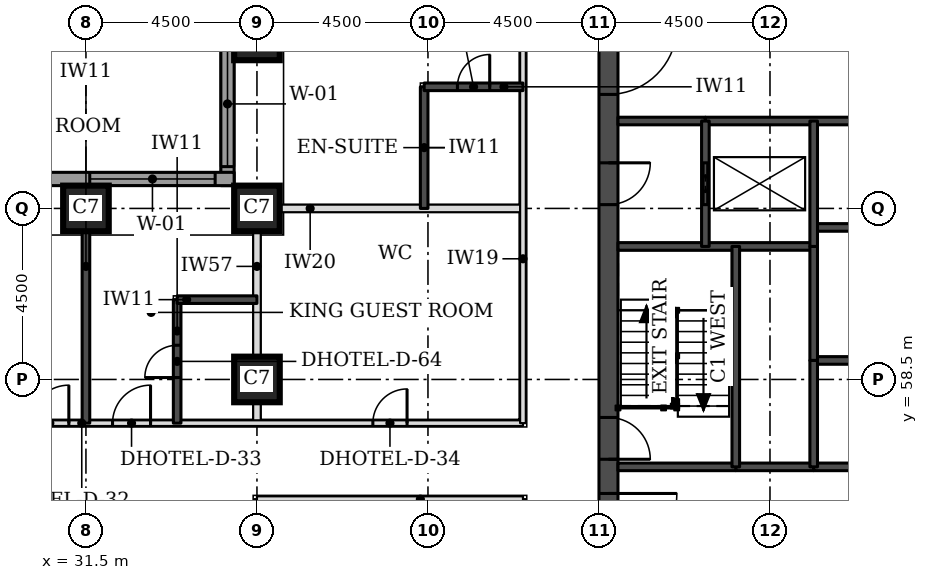
"""IFC4 building model, lengths in metres.
Left out: names, types, materials, properties, quantities, classifications, styles, units other than length and angle.
Written with IfcOpenShell. Run it as: python <this file> out.ifc"""

import sys

from ifc_helpers import new_model, si_unit, direction, frame, frame_2d, origin, origin_2d, place, context, subcontext, project, spatial, rectangle, extrude, element, fill, save


model = new_model("IFC4")
c1 = context("Model", 3, precision=1e-05, world=origin(), true_north=direction((0.0, 1.0)))
c2 = subcontext(c1, "Body", "Model", "MODEL_VIEW")
j1 = project(units=[si_unit("LENGTHUNIT", "METRE"), si_unit("PLANEANGLEUNIT", "RADIAN")], contexts=[c1])
p1 = place(None, origin())
s1 = spatial("IfcSite", under=j1, at=p1, CompositionType="ELEMENT")
p2 = place(p1, origin())
s2 = spatial("IfcBuilding", under=s1, at=p2, CompositionType="ELEMENT")
p3 = place(p2, frame((0.0, 0.0, 36.3)))
s3 = spatial("IfcBuildingStorey", under=s2, at=p3, CompositionType="ELEMENT", Elevation=36.3)
for number, where, z_axis, x_axis in (
    (1, (36.0, 58.5, 0.0), (0.0, 0.0, 1.0), (1.0, 0.0, 0.0)),
    (2, (31.5, 63.0, 0.0), (0.0, 0.0, 1.0), (1.0, 0.0, 0.0)),
    (3, (36.0, 63.0, 0.0), (0.0, 0.0, 1.0), (1.0, 0.0, 0.0)),
    (4, (36.0, 67.5, 0.0), (0.0, 0.0, 1.0), (1.0, 0.0, 0.0)),
):
    element("IfcColumn", number, at=place(p3, frame(where, z_axis=z_axis, x_axis=x_axis)), inside=s3, PredefinedType="COLUMN", context=c2, shape_type="SweptSolid", body=[
        extrude(rectangle(XDim=1.2, YDim=1.2, at=origin_2d()), origin(), (0.0, 0.0, 1.0), 3.3),
    ])
p4 = place(p3, frame((45.25, 49.5, 0.0), z_axis=(0.0, 0.0, 1.0), x_axis=(0.0, 1.0, 0.0)))
e5 = element("IfcWall", 5, at=p4, inside=s3, PredefinedType="SHEAR", context=c2, shape_type="SweptSolid", body=[
    extrude(rectangle(XDim=22.5, YDim=0.5, at=frame_2d((11.25, 0.0))), origin(), (0.0, 0.0, 1.0), 3.3),
])
p5 = place(p4, frame((4.2, 0.0, 0.0)))
e6 = element("IfcOpeningElement", 6, at=p5, cuts=e5, PredefinedType="OPENING", context=c2, shape_type="SweptSolid", body=[
    extrude(rectangle(XDim=1.8, YDim=2.1, at=frame_2d((0.9, 1.05))), frame((0.0, 0.26, 0.0), z_axis=(0.0, -1.0, 0.0), x_axis=(1.0, 0.0, 0.0)), (0.0, 0.0, 1.0), 0.52),
])
p6 = place(p4, frame((6.9, 0.0, 0.0)))
e7 = element("IfcOpeningElement", 7, at=p6, cuts=e5, PredefinedType="OPENING", context=c2, shape_type="SweptSolid", body=[
    extrude(rectangle(XDim=1.1, YDim=2.1, at=frame_2d((0.55, 1.05))), frame((0.0, 0.26, 0.0), z_axis=(0.0, -1.0, 0.0), x_axis=(1.0, 0.0, 0.0)), (0.0, 0.0, 1.0), 0.52),
])
p7 = place(p4, frame((13.6, 0.0, 0.0)))
e8 = element("IfcOpeningElement", 8, at=p7, cuts=e5, PredefinedType="OPENING", context=c2, shape_type="SweptSolid", body=[
    extrude(rectangle(XDim=1.1, YDim=2.1, at=frame_2d((0.55, 1.05))), frame((0.0, 0.26, 0.0), z_axis=(0.0, -1.0, 0.0), x_axis=(1.0, 0.0, 0.0)), (0.0, 0.0, 1.0), 0.52),
])
p8 = place(p4, frame((16.5, 0.0, 0.0)))
e9 = element("IfcOpeningElement", 9, at=p8, cuts=e5, PredefinedType="OPENING", context=c2, shape_type="SweptSolid", body=[
    extrude(rectangle(XDim=1.8, YDim=2.1, at=frame_2d((0.9, 1.05))), frame((0.0, 0.26, 0.0), z_axis=(0.0, -1.0, 0.0), x_axis=(1.0, 0.0, 0.0)), (0.0, 0.0, 1.0), 0.52),
])
p9 = place(p3, frame((35.225, 76.894, 0.0), z_axis=(0.0, 0.0, 1.0), x_axis=(0.0, -1.0, 0.0)))
e10 = element("IfcWall", 10, at=p9, inside=s3, PredefinedType="STANDARD", context=c2, shape_type="SweptSolid", body=[
    extrude(rectangle(XDim=13.293, YDim=0.35, at=frame_2d((6.647, 0.0))), origin(), (0.0, 0.0, 1.0), 3.055),
])
p10 = place(p9, frame((9.493, 0.0, 0.8)))
e11 = element("IfcOpeningElement", 11, at=p10, cuts=e10, PredefinedType="OPENING", context=c2, shape_type="SweptSolid", body=[
    extrude(rectangle(XDim=3.3, YDim=1.5, at=frame_2d((1.65, 0.75))), frame((0.0, 0.185, 0.0), z_axis=(0.0, -1.0, 0.0), x_axis=(1.0, 0.0, 0.0)), (0.0, 0.0, 1.0), 0.37),
])
p11 = place(p3, frame((35.4, 63.775, 0.0), z_axis=(0.0, 0.0, 1.0), x_axis=(-1.0, 0.0, 0.0)))
e12 = element("IfcWall", 12, at=p11, inside=s3, PredefinedType="STANDARD", context=c2, shape_type="SweptSolid", body=[
    extrude(rectangle(XDim=17.793, YDim=0.35, at=frame_2d((8.897, 0.0))), origin(), (0.0, 0.0, 1.0), 3.055),
])
p12 = place(p11, frame((0.5, 0.0, 0.8)))
e13 = element("IfcOpeningElement", 13, at=p12, cuts=e12, PredefinedType="OPENING", context=c2, shape_type="SweptSolid", body=[
    extrude(rectangle(XDim=3.3, YDim=1.5, at=frame_2d((1.65, 0.75))), frame((0.0, 0.185, 0.0), z_axis=(0.0, -1.0, 0.0), x_axis=(1.0, 0.0, 0.0)), (0.0, 0.0, 1.0), 0.37),
])
p13 = place(p11, frame((9.0, 0.0, 0.8)))
e14 = element("IfcOpeningElement", 14, at=p13, cuts=e12, PredefinedType="OPENING", context=c2, shape_type="SweptSolid", body=[
    extrude(rectangle(XDim=3.3, YDim=1.5, at=frame_2d((1.65, 0.75))), frame((0.0, 0.185, 0.0), z_axis=(0.0, -1.0, 0.0), x_axis=(1.0, 0.0, 0.0)), (0.0, 0.0, 1.0), 0.37),
])
p14 = place(p3, frame((36.0, 57.35, 0.0), z_axis=(0.0, 0.0, 1.0), x_axis=(0.0, 1.0, 0.0)))
e15 = element("IfcWall", 15, at=p14, inside=s3, PredefinedType="PARTITIONING", context=c2, shape_type="SweptSolid", body=[
    extrude(rectangle(XDim=5.05, YDim=0.2, at=frame_2d((2.525, 0.0))), origin(), (0.0, 0.0, 1.0), 2.33),
])
p15 = place(p3, frame((36.6, 63.0, 0.0), z_axis=(0.0, 0.0, 1.0), x_axis=(1.0, 0.0, 0.0)))
e16 = element("IfcWall", 16, at=p15, inside=s3, PredefinedType="PARTITIONING", context=c2, shape_type="SweptSolid", body=[
    extrude(rectangle(XDim=6.4, YDim=0.2, at=frame_2d((3.2, 0.0))), origin(), (0.0, 0.0, 1.0), 3.08),
])
p16 = place(p3, frame((43.0, 47.5, 0.0), z_axis=(0.0, 0.0, 1.0), x_axis=(0.0, 1.0, 0.0)))
e17 = element("IfcWall", 17, at=p16, inside=s3, PredefinedType="PARTITIONING", context=c2, shape_type="SweptSolid", body=[
    extrude(rectangle(XDim=7.85, YDim=0.15, at=frame_2d((3.925, 0.0))), origin(), (0.0, 0.0, 1.0), 3.08),
])
p17 = place(p16, frame((3.475, 0.0, 0.0)))
e18 = element("IfcOpeningElement", 18, at=p17, cuts=e17, PredefinedType="OPENING", context=c2, shape_type="SweptSolid", body=[
    extrude(rectangle(XDim=0.9, YDim=2.1, at=frame_2d((0.45, 1.05))), frame((0.0, 0.085, 0.0), z_axis=(0.0, -1.0, 0.0), x_axis=(1.0, 0.0, 0.0)), (0.0, 0.0, 1.0), 0.17),
])
p18 = place(p3, frame((36.0, 54.05, 0.0), z_axis=(0.0, 0.0, 1.0), x_axis=(0.0, 1.0, 0.0)))
e19 = element("IfcWall", 19, at=p18, inside=s3, PredefinedType="PARTITIONING", context=c2, shape_type="SweptSolid", body=[
    extrude(rectangle(XDim=1.3, YDim=0.15, at=frame_2d((0.65, 0.0))), origin(), (0.0, 0.0, 1.0), 2.33),
])
p19 = place(p3, frame((36.0, 55.35, 0.0), z_axis=(0.0, 0.0, 1.0), x_axis=(1.0, 0.0, 0.0)))
e20 = element("IfcWall", 20, at=p19, inside=s3, PredefinedType="PARTITIONING", context=c2, shape_type="SweptSolid", body=[
    extrude(rectangle(XDim=7.0, YDim=0.15, at=frame_2d((3.5, 0.0))), origin(), (0.0, 0.0, 1.0), 3.08),
])
p20 = place(p3, frame((29.38, 57.35, 0.0), z_axis=(0.0, 0.0, 1.0), x_axis=(1.0, 0.0, 0.0)))
e21 = element("IfcWall", 21, at=p20, inside=s3, PredefinedType="PARTITIONING", context=c2, shape_type="SweptSolid", body=[
    extrude(rectangle(XDim=13.62, YDim=0.15, at=frame_2d((6.81, 0.0))), origin(), (0.0, 0.0, 1.0), 3.08),
])
p21 = place(p20, frame((2.82, 0.0, 0.0)))
e22 = element("IfcOpeningElement", 22, at=p21, cuts=e21, PredefinedType="OPENING", context=c2, shape_type="SweptSolid", body=[
    extrude(rectangle(XDim=1.0, YDim=2.1, at=frame_2d((0.5, 1.05))), frame((0.0, 0.085, 0.0), z_axis=(0.0, -1.0, 0.0), x_axis=(1.0, 0.0, 0.0)), (0.0, 0.0, 1.0), 0.17),
])
p22 = place(p20, frame((0.67, 0.0, 0.0)))
e23 = element("IfcOpeningElement", 23, at=p22, cuts=e21, PredefinedType="OPENING", context=c2, shape_type="SweptSolid", body=[
    extrude(rectangle(XDim=1.0, YDim=2.1, at=frame_2d((0.5, 1.05))), frame((0.0, 0.085, 0.0), z_axis=(0.0, -1.0, 0.0), x_axis=(1.0, 0.0, 0.0)), (0.0, 0.0, 1.0), 0.17),
])
p23 = place(p20, frame((9.67, 0.0, 0.0)))
e24 = element("IfcOpeningElement", 24, at=p23, cuts=e21, PredefinedType="OPENING", context=c2, shape_type="SweptSolid", body=[
    extrude(rectangle(XDim=0.9, YDim=2.1, at=frame_2d((0.45, 1.05))), frame((0.0, 0.085, 0.0), z_axis=(0.0, -1.0, 0.0), x_axis=(1.0, 0.0, 0.0)), (0.0, 0.0, 1.0), 0.17),
])
p24 = place(p3, frame((43.0, 57.35, 0.0), z_axis=(0.0, 0.0, 1.0), x_axis=(0.0, 1.0, 0.0)))
e25 = element("IfcWall", 25, at=p24, inside=s3, PredefinedType="PARTITIONING", context=c2, shape_type="SweptSolid", body=[
    extrude(rectangle(XDim=16.65, YDim=0.15, at=frame_2d((8.325, 0.0))), origin(), (0.0, 0.0, 1.0), 3.08),
])
p25 = place(p24, frame((11.25, 0.0, 0.0)))
e26 = element("IfcOpeningElement", 26, at=p25, cuts=e25, PredefinedType="OPENING", context=c2, shape_type="SweptSolid", body=[
    extrude(rectangle(XDim=1.0, YDim=2.1, at=frame_2d((0.5, 1.05))), frame((0.0, 0.085, 0.0), z_axis=(0.0, -1.0, 0.0), x_axis=(1.0, 0.0, 0.0)), (0.0, 0.0, 1.0), 0.17),
])
p26 = place(p24, frame((15.203, 0.0, 0.0)))
e27 = element("IfcOpeningElement", 27, at=p26, cuts=e25, PredefinedType="OPENING", context=c2, shape_type="SweptSolid", body=[
    extrude(rectangle(XDim=1.0, YDim=2.1, at=frame_2d((0.5, 1.05))), frame((0.0, 0.085, 0.0), z_axis=(0.0, -1.0, 0.0), x_axis=(1.0, 0.0, 0.0)), (0.0, 0.0, 1.0), 0.17),
])
p27 = place(p3, frame((31.5, 57.35, 0.0), z_axis=(0.0, 0.0, 1.0), x_axis=(0.0, 1.0, 0.0)))
e28 = element("IfcWall", 28, at=p27, inside=s3, PredefinedType="SOLIDWALL", context=c2, shape_type="SweptSolid", body=[
    extrude(rectangle(XDim=5.05, YDim=0.2, at=frame_2d((2.525, 0.0))), origin(), (0.0, 0.0, 1.0), 3.08),
])
p28 = place(p3, frame((33.9, 57.35, 0.0), z_axis=(0.0, 0.0, 1.0), x_axis=(0.0, 1.0, 0.0)))
e29 = element("IfcWall", 29, at=p28, inside=s3, PredefinedType="SOLIDWALL", context=c2, shape_type="SweptSolid", body=[
    extrude(rectangle(XDim=3.25, YDim=0.2, at=frame_2d((1.625, 0.0))), origin(), (0.0, 0.0, 1.0), 3.08),
])
p29 = place(p28, frame((1.2, 0.0, 0.0)))
e30 = element("IfcOpeningElement", 30, at=p29, cuts=e29, PredefinedType="OPENING", context=c2, shape_type="SweptSolid", body=[
    extrude(rectangle(XDim=0.85, YDim=2.1, at=frame_2d((0.425, 1.05))), frame((0.0, 0.11, 0.0), z_axis=(0.0, -1.0, 0.0), x_axis=(1.0, 0.0, 0.0)), (0.0, 0.0, 1.0), 0.22),
])
p30 = place(p3, frame((33.9, 60.6, 0.0), z_axis=(0.0, 0.0, 1.0), x_axis=(1.0, 0.0, 0.0)))
e31 = element("IfcWall", 31, at=p30, inside=s3, PredefinedType="SOLIDWALL", context=c2, shape_type="SweptSolid", body=[
    extrude(rectangle(XDim=2.1, YDim=0.2, at=frame_2d((1.05, 0.0))), origin(), (0.0, 0.0, 1.0), 3.08),
])
p31 = place(p3, frame((40.4, 63.0, 0.0), z_axis=(0.0, 0.0, 1.0), x_axis=(0.0, 1.0, 0.0)))
e32 = element("IfcWall", 32, at=p31, inside=s3, PredefinedType="SOLIDWALL", context=c2, shape_type="SweptSolid", body=[
    extrude(rectangle(XDim=3.2, YDim=0.2, at=frame_2d((1.6, 0.0))), origin(), (0.0, 0.0, 1.0), 3.08),
])
p32 = place(p3, frame((40.4, 66.2, 0.0), z_axis=(0.0, 0.0, 1.0), x_axis=(1.0, 0.0, 0.0)))
e33 = element("IfcWall", 33, at=p32, inside=s3, PredefinedType="SOLIDWALL", context=c2, shape_type="SweptSolid", body=[
    extrude(rectangle(XDim=2.6, YDim=0.2, at=frame_2d((1.3, 0.0))), origin(), (0.0, 0.0, 1.0), 3.08),
])
p33 = place(p32, frame((0.875, 0.0, 0.0)))
e34 = element("IfcOpeningElement", 34, at=p33, cuts=e33, PredefinedType="OPENING", context=c2, shape_type="SweptSolid", body=[
    extrude(rectangle(XDim=0.85, YDim=2.1, at=frame_2d((0.425, 1.05))), frame((0.0, 0.11, 0.0), z_axis=(0.0, -1.0, 0.0), x_axis=(1.0, 0.0, 0.0)), (0.0, 0.0, 1.0), 0.22),
])
p34 = place(p3, frame((48.6, 56.2, 0.0), z_axis=(0.0, 0.0, 1.0), x_axis=(1.0, 0.0, 0.0)))
e35 = element("IfcWall", 35, at=p34, inside=s3, PredefinedType="SOLIDWALL", context=c2, shape_type="SweptSolid", body=[
    extrude(rectangle(XDim=2.05, YDim=0.2, at=frame_2d((1.025, 0.0))), origin(), (0.0, 0.0, 1.0), 3.08),
])
p35 = place(p3, frame((45.5, 56.2, 0.0), z_axis=(0.0, 0.0, 1.0), x_axis=(1.0, 0.0, 0.0)))
e36 = element("IfcWall", 36, at=p35, inside=s3, PredefinedType="SOLIDWALL", context=c2, shape_type="SweptSolid", body=[
    extrude(rectangle(XDim=3.1, YDim=0.2, at=frame_2d((1.55, 0.0))), origin(), (0.0, 0.0, 1.0), 3.08),
])
p36 = place(p3, frame((50.65, 56.2, 0.0), z_axis=(0.0, 0.0, 1.0), x_axis=(1.0, 0.0, 0.0)))
e37 = element("IfcWall", 37, at=p36, inside=s3, PredefinedType="SOLIDWALL", context=c2, shape_type="SweptSolid", body=[
    extrude(rectangle(XDim=11.2, YDim=0.2, at=frame_2d((5.6, 0.0))), origin(), (0.0, 0.0, 1.0), 3.08),
])
p37 = place(p3, frame((50.65, 59.0, 0.0), z_axis=(0.0, 0.0, 1.0), x_axis=(1.0, 0.0, 0.0)))
e38 = element("IfcWall", 38, at=p37, inside=s3, PredefinedType="SOLIDWALL", context=c2, shape_type="SweptSolid", body=[
    extrude(rectangle(XDim=11.2, YDim=0.2, at=frame_2d((5.6, 0.0))), origin(), (0.0, 0.0, 1.0), 3.3),
])
p38 = place(p3, frame((45.5, 62.0, 0.0), z_axis=(0.0, 0.0, 1.0), x_axis=(1.0, 0.0, 0.0)))
e39 = element("IfcWall", 39, at=p38, inside=s3, PredefinedType="SOLIDWALL", context=c2, shape_type="SweptSolid", body=[
    extrude(rectangle(XDim=5.15, YDim=0.2, at=frame_2d((2.575, 0.0))), origin(), (0.0, 0.0, 1.0), 3.08),
])
p39 = place(p3, frame((50.65, 62.5, 0.0), z_axis=(0.0, 0.0, 1.0), x_axis=(1.0, 0.0, 0.0)))
e40 = element("IfcWall", 40, at=p39, inside=s3, PredefinedType="SOLIDWALL", context=c2, shape_type="SweptSolid", body=[
    extrude(rectangle(XDim=11.2, YDim=0.2, at=frame_2d((5.6, 0.0))), origin(), (0.0, 0.0, 1.0), 3.3),
])
p40 = place(p3, frame((45.5, 65.3, 0.0), z_axis=(0.0, 0.0, 1.0), x_axis=(1.0, 0.0, 0.0)))
e41 = element("IfcWall", 41, at=p40, inside=s3, PredefinedType="SOLIDWALL", context=c2, shape_type="SweptSolid", body=[
    extrude(rectangle(XDim=2.3, YDim=0.2, at=frame_2d((1.15, 0.0))), origin(), (0.0, 0.0, 1.0), 3.08),
])
p41 = place(p3, frame((47.8, 65.3, 0.0), z_axis=(0.0, 0.0, 1.0), x_axis=(1.0, 0.0, 0.0)))
e42 = element("IfcWall", 42, at=p41, inside=s3, PredefinedType="SOLIDWALL", context=c2, shape_type="SweptSolid", body=[
    extrude(rectangle(XDim=16.9, YDim=0.2, at=frame_2d((8.45, 0.0))), origin(), (0.0, 0.0, 1.0), 3.08),
])
p42 = place(p3, frame((47.8, 62.0, 0.0), z_axis=(0.0, 0.0, 1.0), x_axis=(0.0, 1.0, 0.0)))
e43 = element("IfcWall", 43, at=p42, inside=s3, PredefinedType="SOLIDWALL", context=c2, shape_type="SweptSolid", body=[
    extrude(rectangle(XDim=3.3, YDim=0.2, at=frame_2d((1.65, 0.0))), origin(), (0.0, 0.0, 1.0), 3.08),
])
p43 = place(p42, frame((1.1, 0.0, 0.0)))
e44 = element("IfcOpeningElement", 44, at=p43, cuts=e43, PredefinedType="OPENING", context=c2, shape_type="SweptSolid", body=[
    extrude(rectangle(XDim=1.1, YDim=2.1, at=frame_2d((0.55, 1.05))), frame((0.0, 0.11, 0.0), z_axis=(0.0, -1.0, 0.0), x_axis=(1.0, 0.0, 0.0)), (0.0, 0.0, 1.0), 0.22),
])
p44 = place(p3, frame((48.6, 56.2, 0.0), z_axis=(0.0, 0.0, 1.0), x_axis=(0.0, 1.0, 0.0)))
e45 = element("IfcWall", 45, at=p44, inside=s3, PredefinedType="SOLIDWALL", context=c2, shape_type="SweptSolid", body=[
    extrude(rectangle(XDim=5.8, YDim=0.2, at=frame_2d((2.9, 0.0))), origin(), (0.0, 0.0, 1.0), 3.08),
])
p45 = place(p3, frame((50.65, 59.0, 0.0), z_axis=(0.0, 0.0, 1.0), x_axis=(0.0, 1.0, 0.0)))
e46 = element("IfcWall", 46, at=p45, inside=s3, PredefinedType="SOLIDWALL", context=c2, shape_type="SweptSolid", body=[
    extrude(rectangle(XDim=3.0, YDim=0.2, at=frame_2d((1.5, 0.0))), origin(), (0.0, 0.0, 1.0), 3.3),
])
p46 = place(p3, frame((50.65, 56.2, 0.0), z_axis=(0.0, 0.0, 1.0), x_axis=(0.0, 1.0, 0.0)))
e47 = element("IfcWall", 47, at=p46, inside=s3, PredefinedType="SOLIDWALL", context=c2, shape_type="SweptSolid", body=[
    extrude(rectangle(XDim=2.8, YDim=0.2, at=frame_2d((1.4, 0.0))), origin(), (0.0, 0.0, 1.0), 3.08),
])
p47 = place(p3, frame((50.65, 62.0, 0.0), z_axis=(0.0, 0.0, 1.0), x_axis=(0.0, 1.0, 0.0)))
e48 = element("IfcWall", 48, at=p47, inside=s3, PredefinedType="SOLIDWALL", context=c2, shape_type="SweptSolid", body=[
    extrude(rectangle(XDim=3.3, YDim=0.2, at=frame_2d((1.65, 0.0))), origin(), (0.0, 0.0, 1.0), 3.08),
])
p48 = place(p10, origin())
e49 = element("IfcWindow", 49, at=p48, inside=s3, PartitioningType="SINGLE_PANEL", PredefinedType="WINDOW", context=c2, shape_type="SweptSolid", body=[
    extrude(rectangle(XDim=3.3, YDim=1.5, at=frame_2d((1.65, 0.75))), frame((0.0, 0.085, 0.0), z_axis=(0.0, -1.0, 0.0), x_axis=(1.0, 0.0, 0.0)), (0.0, 0.0, 1.0), 0.06),
])
fill(e11, e49)
p49 = place(p12, origin())
e50 = element("IfcWindow", 50, at=p49, inside=s3, PartitioningType="SINGLE_PANEL", PredefinedType="WINDOW", context=c2, shape_type="SweptSolid", body=[
    extrude(rectangle(XDim=3.3, YDim=1.5, at=frame_2d((1.65, 0.75))), frame((0.0, 0.085, 0.0), z_axis=(0.0, -1.0, 0.0), x_axis=(1.0, 0.0, 0.0)), (0.0, 0.0, 1.0), 0.06),
])
fill(e13, e50)
p50 = place(p21, origin())
e51 = element("IfcDoor", 51, at=p50, inside=s3, OperationType="SINGLE_SWING_RIGHT", PredefinedType="DOOR", context=c2, shape_type="SweptSolid", body=[
    extrude(rectangle(XDim=1.0, YDim=2.1, at=frame_2d((0.5, 1.05))), frame((0.0, 0.025, 0.0), z_axis=(0.0, -1.0, 0.0), x_axis=(1.0, 0.0, 0.0)), (0.0, 0.0, 1.0), 0.05),
])
fill(e22, e51)
p51 = place(p29, origin())
e52 = element("IfcDoor", 52, at=p51, inside=s3, OperationType="SINGLE_SWING_LEFT", PredefinedType="DOOR", context=c2, shape_type="SweptSolid", body=[
    extrude(rectangle(XDim=0.85, YDim=2.1, at=frame_2d((0.425, 1.05))), frame((0.0, 0.025, 0.0), z_axis=(0.0, -1.0, 0.0), x_axis=(1.0, 0.0, 0.0)), (0.0, 0.0, 1.0), 0.05),
])
fill(e30, e52)
p52 = place(p22, origin())
e53 = element("IfcDoor", 53, at=p52, inside=s3, OperationType="SINGLE_SWING_RIGHT", PredefinedType="DOOR", context=c2, shape_type="SweptSolid", body=[
    extrude(rectangle(XDim=1.0, YDim=2.1, at=frame_2d((0.5, 1.05))), frame((0.0, 0.025, 0.0), z_axis=(0.0, -1.0, 0.0), x_axis=(1.0, 0.0, 0.0)), (0.0, 0.0, 1.0), 0.05),
])
fill(e23, e53)
p53 = place(p33, origin())
e54 = element("IfcDoor", 54, at=p53, inside=s3, OperationType="SINGLE_SWING_RIGHT", PredefinedType="DOOR", context=c2, shape_type="SweptSolid", body=[
    extrude(rectangle(XDim=0.85, YDim=2.1, at=frame_2d((0.425, 1.05))), frame((0.0, 0.025, 0.0), z_axis=(0.0, -1.0, 0.0), x_axis=(1.0, 0.0, 0.0)), (0.0, 0.0, 1.0), 0.05),
])
fill(e34, e54)
p54 = place(p23, origin())
e55 = element("IfcDoor", 55, at=p54, inside=s3, OperationType="SINGLE_SWING_RIGHT", PredefinedType="DOOR", context=c2, shape_type="SweptSolid", body=[
    extrude(rectangle(XDim=0.9, YDim=2.1, at=frame_2d((0.45, 1.05))), frame((0.0, 0.025, 0.0), z_axis=(0.0, -1.0, 0.0), x_axis=(1.0, 0.0, 0.0)), (0.0, 0.0, 1.0), 0.05),
])
fill(e24, e55)
p55 = place(p43, origin())
e56 = element("IfcDoor", 56, at=p55, inside=s3, OperationType="DOUBLE_DOOR_SLIDING", PredefinedType="DOOR", context=c2, shape_type="SweptSolid", body=[
    extrude(rectangle(XDim=1.1, YDim=2.1, at=frame_2d((0.55, 1.05))), frame((0.0, 0.025, 0.0), z_axis=(0.0, -1.0, 0.0), x_axis=(1.0, 0.0, 0.0)), (0.0, 0.0, 1.0), 0.05),
])
fill(e44, e56)
p56 = place(p5, frame((1.8, 0.0, 0.0), z_axis=(0.0, 0.0, 1.0), x_axis=(-1.0, 0.0, 0.0)))
e57 = element("IfcDoor", 57, at=p56, inside=s3, OperationType="SINGLE_SWING_LEFT", PredefinedType="DOOR", context=c2, shape_type="SweptSolid", body=[
    extrude(rectangle(XDim=1.8, YDim=2.1, at=frame_2d((0.9, 1.05))), frame((0.0, 0.025, 0.0), z_axis=(0.0, -1.0, 0.0), x_axis=(1.0, 0.0, 0.0)), (0.0, 0.0, 1.0), 0.05),
])
fill(e6, e57)
p57 = place(p6, frame((1.1, 0.0, 0.0), z_axis=(0.0, 0.0, 1.0), x_axis=(-1.0, 0.0, 0.0)))
e58 = element("IfcDoor", 58, at=p57, inside=s3, OperationType="SINGLE_SWING_RIGHT", PredefinedType="DOOR", context=c2, shape_type="SweptSolid", body=[
    extrude(rectangle(XDim=1.1, YDim=2.1, at=frame_2d((0.55, 1.05))), frame((0.0, 0.025, 0.0), z_axis=(0.0, -1.0, 0.0), x_axis=(1.0, 0.0, 0.0)), (0.0, 0.0, 1.0), 0.05),
])
fill(e7, e58)
p58 = place(p7, frame((1.1, 0.0, 0.0), z_axis=(0.0, 0.0, 1.0), x_axis=(-1.0, 0.0, 0.0)))
e59 = element("IfcDoor", 59, at=p58, inside=s3, OperationType="SINGLE_SWING_LEFT", PredefinedType="DOOR", context=c2, shape_type="SweptSolid", body=[
    extrude(rectangle(XDim=1.1, YDim=2.1, at=frame_2d((0.55, 1.05))), frame((0.0, 0.025, 0.0), z_axis=(0.0, -1.0, 0.0), x_axis=(1.0, 0.0, 0.0)), (0.0, 0.0, 1.0), 0.05),
])
fill(e8, e59)
p59 = place(p8, frame((1.8, 0.0, 0.0), z_axis=(0.0, 0.0, 1.0), x_axis=(-1.0, 0.0, 0.0)))
e60 = element("IfcDoor", 60, at=p59, inside=s3, OperationType="SINGLE_SWING_LEFT", PredefinedType="DOOR", context=c2, shape_type="SweptSolid", body=[
    extrude(rectangle(XDim=1.8, YDim=2.1, at=frame_2d((0.9, 1.05))), frame((0.0, 0.025, 0.0), z_axis=(0.0, -1.0, 0.0), x_axis=(1.0, 0.0, 0.0)), (0.0, 0.0, 1.0), 0.05),
])
fill(e9, e60)
save(model, sys.argv[1])
